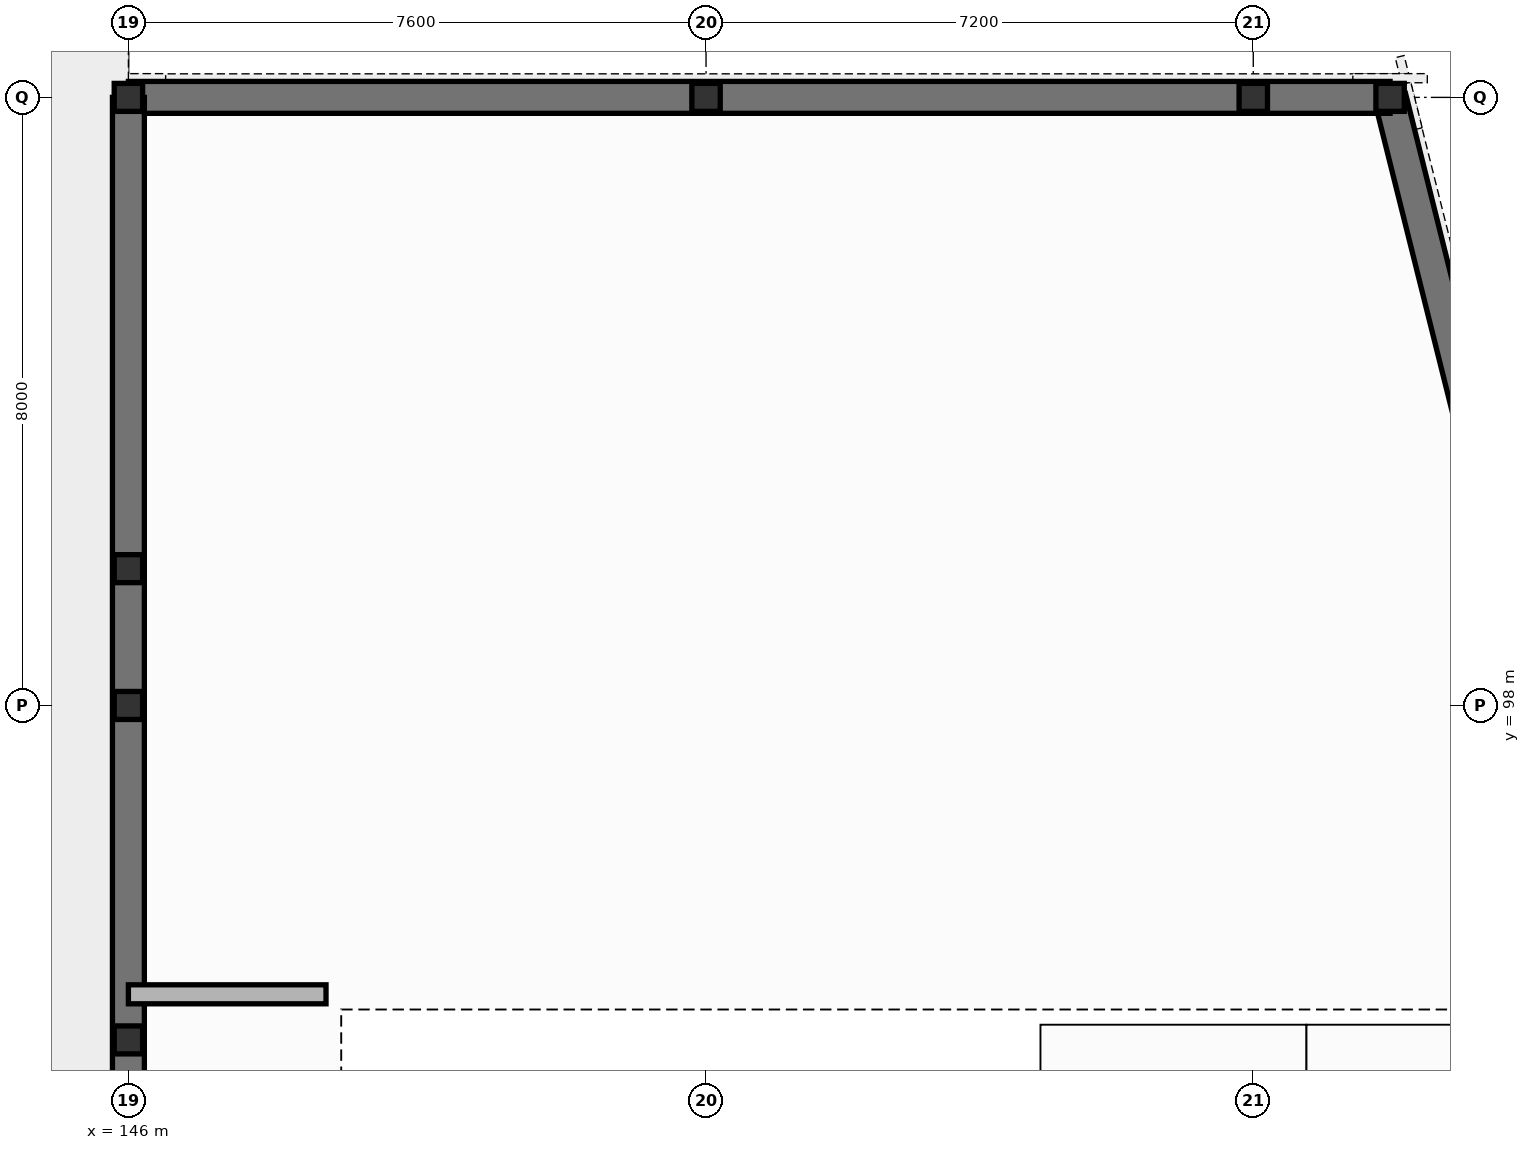
"""IFC4 building model, lengths in metres.
Left out: names, types, materials, properties, quantities, classifications, styles, units other than length and angle.
Written with IfcOpenShell. Run it as: python <this file> out.ifc"""

import sys

from ifc_helpers import new_model, si_unit, direction, frame, frame_2d, origin, origin_2d, place, context, subcontext, project, spatial, rectangle, i_section, extrude, element, fill, save


model = new_model("IFC4")
c1 = context("Model", 3, precision=1e-05, world=origin(), true_north=direction((0.0, 1.0)))
c2 = subcontext(c1, "Body", "Model", "MODEL_VIEW")
j1 = project(units=[si_unit("LENGTHUNIT", "METRE"), si_unit("PLANEANGLEUNIT", "RADIAN")], contexts=[c1])
p1 = place(None, origin())
s1 = spatial("IfcSite", under=j1, at=p1, CompositionType="ELEMENT")
p2 = place(p1, origin())
s2 = spatial("IfcBuilding", under=s1, at=p2, CompositionType="ELEMENT")
p3 = place(p2, frame((0.0, 0.0, 5.1)))
s3 = spatial("IfcBuildingStorey", under=s2, at=p3, CompositionType="ELEMENT", Elevation=5.1)
for number, where, z_axis, x_axis in (
    (1, (146.0, 98.0, 0.0), (0.0, 0.0, 1.0), (1.0, 0.0, 0.0)),
    (2, (146.0, 106.0, 0.0), (0.0, 0.0, 1.0), (1.0, 0.0, 0.0)),
    (3, (153.6, 106.0, 0.0), (0.0, 0.0, 1.0), (1.0, 0.0, 0.0)),
    (4, (160.8, 106.0, 0.0), (0.0, 0.0, 1.0), (1.0, 0.0, 0.0)),
    (5, (162.6, 106.0, 0.0), (0.0, 0.0, 1.0), (1.0, 0.0, 0.0)),
    (6, (146.0, 93.6, 0.0), (0.0, 0.0, 1.0), (1.0, 0.0, 0.0)),
    (7, (146.0, 99.8, 0.0), (0.0, 0.0, 1.0), (1.0, 0.0, 0.0)),
):
    element("IfcColumn", number, at=place(p3, frame(where, z_axis=z_axis, x_axis=x_axis)), inside=s3, PredefinedType="COLUMN", context=c2, shape_type="SweptSolid", body=[
        extrude(i_section(OverallWidth=0.373, OverallDepth=0.368, WebThickness=0.015, FlangeThickness=0.024, at=origin_2d()), origin(), (0.0, 0.0, 1.0), 3.84),
    ])
p4 = place(p3, frame((168.0, 84.4, 0.0), z_axis=(0.0, 0.0, 1.0), x_axis=(-0.242530464893, 0.970143790167, 0.0)))
e8 = element("IfcWall", 8, at=p4, inside=s3, PredefinedType="SOLIDWALL", context=c2, shape_type="SweptSolid", body=[
    extrude(rectangle(XDim=22.265, YDim=0.42, at=frame_2d((11.132, 0.0))), origin(), (0.0, 0.0, 1.0), 3.55),
])
p5 = place(p4, frame((4.0, 0.0, 1.0)))
e9 = element("IfcOpeningElement", 9, at=p5, cuts=e8, PredefinedType="OPENING", context=c2, shape_type="SweptSolid", body=[
    extrude(rectangle(XDim=1.15, YDim=2.3, at=frame_2d((0.575, 1.15))), frame((0.0, 0.22, 0.0), z_axis=(0.0, -1.0, 0.0), x_axis=(1.0, 0.0, 0.0)), (0.0, 0.0, 1.0), 0.44),
])
p6 = place(p4, frame((11.85, 0.0, 1.0)))
e10 = element("IfcOpeningElement", 10, at=p6, cuts=e8, PredefinedType="OPENING", context=c2, shape_type="SweptSolid", body=[
    extrude(rectangle(XDim=0.9, YDim=2.2, at=frame_2d((0.45, 1.1))), frame((0.0, 0.22, 0.0), z_axis=(0.0, -1.0, 0.0), x_axis=(1.0, 0.0, 0.0)), (0.0, 0.0, 1.0), 0.44),
])
p7 = place(p4, frame((16.8, 0.0, 1.0)))
e11 = element("IfcOpeningElement", 11, at=p7, cuts=e8, PredefinedType="OPENING", context=c2, shape_type="SweptSolid", body=[
    extrude(rectangle(XDim=1.15, YDim=2.3, at=frame_2d((0.575, 1.15))), frame((0.0, 0.22, 0.0), z_axis=(0.0, -1.0, 0.0), x_axis=(1.0, 0.0, 0.0)), (0.0, 0.0, 1.0), 0.44),
])
p8 = place(p3, frame((146.0, 106.0, 0.0), z_axis=(0.0, 0.0, 1.0), x_axis=(1.0, 0.0, 0.0)))
e12 = element("IfcWall", 12, at=p8, inside=s3, PredefinedType="SOLIDWALL", context=c2, shape_type="SweptSolid", body=[
    extrude(rectangle(XDim=16.6, YDim=0.42, at=frame_2d((8.3, 0.0))), origin(), (0.0, 0.0, 1.0), 3.55),
])
p9 = place(p8, frame((3.5, 0.0, 0.793)))
e13 = element("IfcOpeningElement", 13, at=p9, cuts=e12, PredefinedType="OPENING", context=c2, shape_type="SweptSolid", body=[
    extrude(rectangle(XDim=1.2, YDim=2.1, at=frame_2d((0.6, 1.05))), frame((0.0, 0.22, 0.0), z_axis=(0.0, -1.0, 0.0), x_axis=(1.0, 0.0, 0.0)), (0.0, 0.0, 1.0), 0.44),
])
p10 = place(p8, frame((10.5, 0.0, 0.793)))
e14 = element("IfcOpeningElement", 14, at=p10, cuts=e12, PredefinedType="OPENING", context=c2, shape_type="SweptSolid", body=[
    extrude(rectangle(XDim=1.2, YDim=2.1, at=frame_2d((0.6, 1.05))), frame((0.0, 0.22, 0.0), z_axis=(0.0, -1.0, 0.0), x_axis=(1.0, 0.0, 0.0)), (0.0, 0.0, 1.0), 0.44),
])
p11 = place(p3, frame((146.0, 82.2, 0.0), z_axis=(0.0, 0.0, 1.0), x_axis=(0.0, 1.0, 0.0)))
e15 = element("IfcWall", 15, at=p11, inside=s3, PredefinedType="SOLIDWALL", context=c2, shape_type="SweptSolid", body=[
    extrude(rectangle(XDim=23.8, YDim=0.42, at=frame_2d((11.9, 0.0))), origin(), (0.0, 0.0, 1.0), 3.84),
])
p12 = place(p11, frame((5.85, 0.0, 0.9)))
e16 = element("IfcOpeningElement", 16, at=p12, cuts=e15, PredefinedType="OPENING", context=c2, shape_type="SweptSolid", body=[
    extrude(rectangle(XDim=1.2, YDim=2.1, at=frame_2d((0.6, 1.05))), frame((0.0, 0.22, 0.0), z_axis=(0.0, -1.0, 0.0), x_axis=(1.0, 0.0, 0.0)), (0.0, 0.0, 1.0), 0.44),
])
p13 = place(p11, frame((14.15, 0.0, 0.9)))
e17 = element("IfcOpeningElement", 17, at=p13, cuts=e15, PredefinedType="OPENING", context=c2, shape_type="SweptSolid", body=[
    extrude(rectangle(XDim=1.2, YDim=2.1, at=frame_2d((0.6, 1.05))), frame((0.0, 0.22, 0.0), z_axis=(0.0, -1.0, 0.0), x_axis=(1.0, 0.0, 0.0)), (0.0, 0.0, 1.0), 0.44),
])
p14 = place(p3, frame((146.0, 94.2, 0.0), z_axis=(0.0, 0.0, 1.0), x_axis=(1.0, 0.0, 0.0)))
e18 = element("IfcWall", 18, at=p14, inside=s3, PredefinedType="PARTITIONING", context=c2, shape_type="SweptSolid", body=[
    extrude(rectangle(XDim=2.6, YDim=0.25, at=frame_2d((1.3, 0.0))), origin(), (0.0, 0.0, 1.0), 3.55),
])
p15 = place(p14, frame((0.8, 0.0, 0.0)))
e19 = element("IfcOpeningElement", 19, at=p15, cuts=e18, PredefinedType="OPENING", context=c2, shape_type="SweptSolid", body=[
    extrude(rectangle(XDim=1.0, YDim=2.15, at=frame_2d((0.5, 1.075))), frame((0.0, 0.135, 0.0), z_axis=(0.0, -1.0, 0.0), x_axis=(1.0, 0.0, 0.0)), (0.0, 0.0, 1.0), 0.27),
])
p16 = place(p9, origin())
e20 = element("IfcWindow", 20, at=p16, inside=s3, PartitioningType="SINGLE_PANEL", PredefinedType="WINDOW", context=c2, shape_type="SweptSolid", body=[
    extrude(rectangle(XDim=1.2, YDim=2.1, at=frame_2d((0.6, 1.05))), frame((0.0, 0.03, 0.0), z_axis=(0.0, -1.0, 0.0), x_axis=(1.0, 0.0, 0.0)), (0.0, 0.0, 1.0), 0.06),
])
fill(e13, e20)
p17 = place(p10, origin())
e21 = element("IfcWindow", 21, at=p17, inside=s3, PartitioningType="SINGLE_PANEL", PredefinedType="WINDOW", context=c2, shape_type="SweptSolid", body=[
    extrude(rectangle(XDim=1.2, YDim=2.1, at=frame_2d((0.6, 1.05))), frame((0.0, 0.03, 0.0), z_axis=(0.0, -1.0, 0.0), x_axis=(1.0, 0.0, 0.0)), (0.0, 0.0, 1.0), 0.06),
])
fill(e14, e21)
p18 = place(p13, origin())
e22 = element("IfcWindow", 22, at=p18, inside=s3, PartitioningType="SINGLE_PANEL", PredefinedType="WINDOW", context=c2, shape_type="SweptSolid", body=[
    extrude(rectangle(XDim=1.2, YDim=2.1, at=frame_2d((0.6, 1.05))), frame((0.0, 0.03, 0.0), z_axis=(0.0, -1.0, 0.0), x_axis=(1.0, 0.0, 0.0)), (0.0, 0.0, 1.0), 0.06),
])
fill(e17, e22)
p19 = place(p15, origin())
e23 = element("IfcDoor", 23, at=p19, inside=s3, OperationType="SINGLE_SWING_LEFT", PredefinedType="DOOR", context=c2, shape_type="SweptSolid", body=[
    extrude(rectangle(XDim=1.0, YDim=2.15, at=frame_2d((0.5, 1.075))), frame((0.0, 0.025, 0.0), z_axis=(0.0, -1.0, 0.0), x_axis=(1.0, 0.0, 0.0)), (0.0, 0.0, 1.0), 0.05),
])
fill(e19, e23)
save(model, sys.argv[1])
